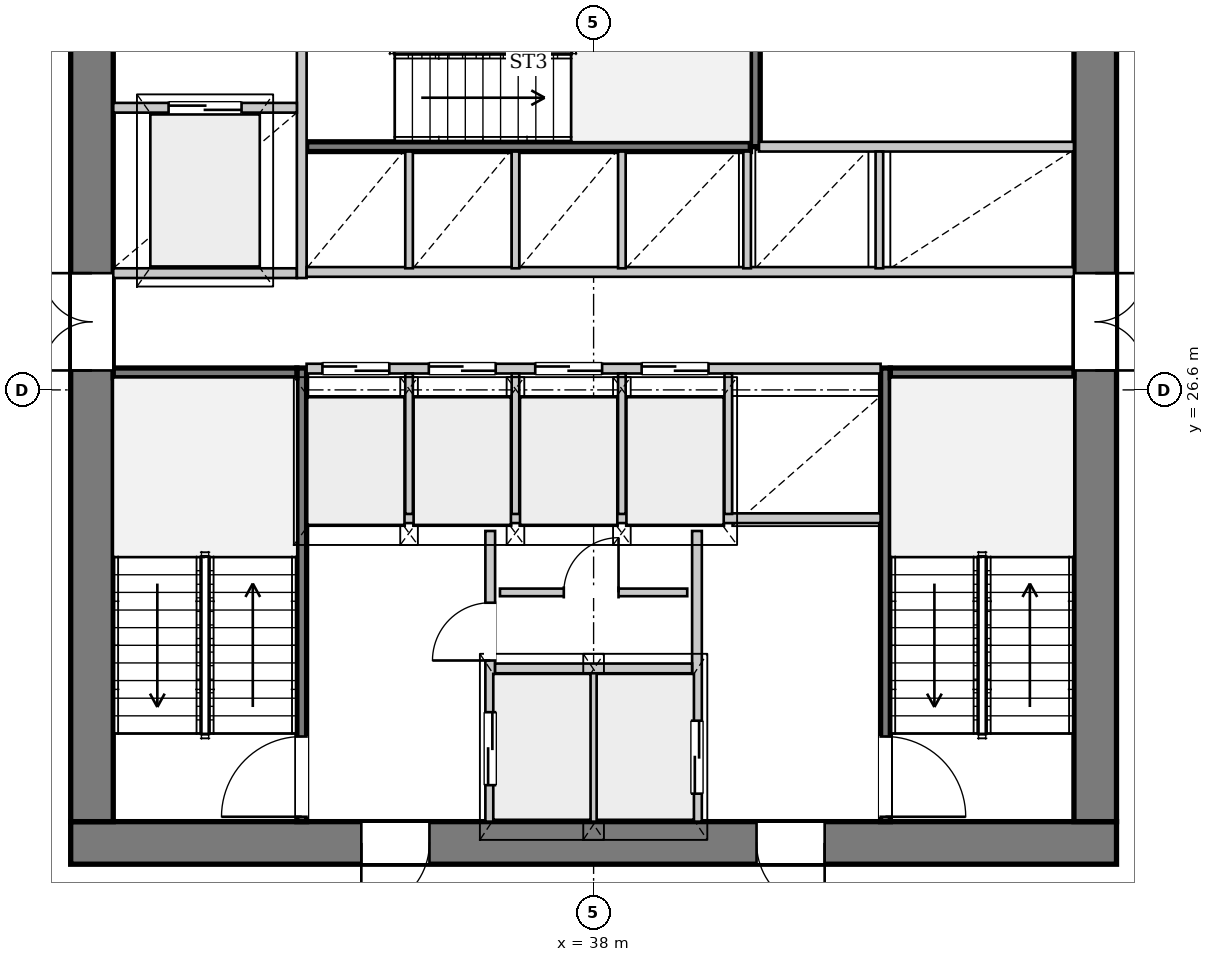
"""IFC4 building model, lengths in metres.
Left out: names, types, materials, properties, quantities, classifications, styles, units other than length and angle.
Written with IfcOpenShell. Run it as: python <this file> out.ifc"""

import sys

from ifc_helpers import new_model, si_unit, direction, frame, frame_2d, origin, place, context, subcontext, project, spatial, rectangle, extrude, source, transform, mapped, element, fill, save


model = new_model("IFC4")
c1 = context("Model", 3, precision=1e-05, world=origin(), true_north=direction((0.0, 1.0)))
c2 = subcontext(c1, "Body", "Model", "MODEL_VIEW")
j1 = project(units=[si_unit("LENGTHUNIT", "METRE"), si_unit("PLANEANGLEUNIT", "RADIAN")], contexts=[c1])
p1 = place(None, origin())
s1 = spatial("IfcSite", under=j1, at=p1, CompositionType="ELEMENT")
p2 = place(p1, origin())
s2 = spatial("IfcBuilding", under=s1, at=p2, CompositionType="ELEMENT")
p3 = place(p2, frame((0.0, 0.0, 87.95)))
s3 = spatial("IfcBuildingStorey", under=s2, at=p3, CompositionType="ELEMENT", Elevation=87.95)
p4 = place(p3, frame((46.6, 19.15, 0.0), z_axis=(0.0, 0.0, 1.0), x_axis=(-1.0, 0.0, 0.0)))
e1 = element("IfcWall", 1, at=p4, inside=s3, PredefinedType="SHEAR", context=c2, shape_type="SweptSolid", body=[
    extrude(rectangle(XDim=17.2, YDim=0.7, at=frame_2d((8.6, 0.0))), origin(), (0.0, 0.0, 1.0), 3.3),
])
p5 = place(p4, frame((4.8, 0.0, 0.0)))
e2 = element("IfcOpeningElement", 2, at=p5, cuts=e1, PredefinedType="OPENING", context=c2, shape_type="SweptSolid", body=[
    extrude(rectangle(XDim=1.12, YDim=2.25, at=frame_2d((0.56, 1.125))), frame((0.0, 0.36, 0.0), z_axis=(0.0, -1.0, 0.0), x_axis=(1.0, 0.0, 0.0)), (0.0, 0.0, 1.0), 0.72),
])
p6 = place(p4, frame((11.3, 0.0, 0.0)))
e3 = element("IfcOpeningElement", 3, at=p6, cuts=e1, PredefinedType="OPENING", context=c2, shape_type="SweptSolid", body=[
    extrude(rectangle(XDim=1.12, YDim=2.25, at=frame_2d((0.56, 1.125))), frame((0.0, 0.36, 0.0), z_axis=(0.0, -1.0, 0.0), x_axis=(1.0, 0.0, 0.0)), (0.0, 0.0, 1.0), 0.72),
])
p7 = place(p3, frame((29.75, 19.5, 0.0), z_axis=(0.0, 0.0, 1.0), x_axis=(0.0, 1.0, 0.0)))
e4 = element("IfcWall", 4, at=p7, inside=s3, PredefinedType="SHEAR", context=c2, shape_type="SweptSolid", body=[
    extrude(rectangle(XDim=14.2, YDim=0.7, at=frame_2d((7.1, 0.0))), origin(), (0.0, 0.0, 1.0), 3.3),
])
p8 = place(p7, frame((7.42, 0.0, 0.0)))
e5 = element("IfcOpeningElement", 5, at=p8, cuts=e4, PredefinedType="OPENING", context=c2, shape_type="SweptSolid", body=[
    extrude(rectangle(XDim=1.6, YDim=2.2, at=frame_2d((0.8, 1.1))), frame((0.0, 0.36, 0.0), z_axis=(0.0, -1.0, 0.0), x_axis=(1.0, 0.0, 0.0)), (0.0, 0.0, 1.0), 0.72),
])
p9 = place(p3, frame((46.25, 33.7, 0.0), z_axis=(0.0, 0.0, 1.0), x_axis=(0.0, -1.0, 0.0)))
e6 = element("IfcWall", 6, at=p9, inside=s3, PredefinedType="SHEAR", context=c2, shape_type="SweptSolid", body=[
    extrude(rectangle(XDim=14.2, YDim=0.7, at=frame_2d((7.1, 0.0))), origin(), (0.0, 0.0, 1.0), 3.3),
])
p10 = place(p9, frame((5.18, 0.0, 0.0)))
e7 = element("IfcOpeningElement", 7, at=p10, cuts=e6, PredefinedType="OPENING", context=c2, shape_type="SweptSolid", body=[
    extrude(rectangle(XDim=1.6, YDim=2.2, at=frame_2d((0.8, 1.1))), frame((0.0, 0.36, 0.0), z_axis=(0.0, -1.0, 0.0), x_axis=(1.0, 0.0, 0.0)), (0.0, 0.0, 1.0), 0.72),
])
p11 = place(p3, frame((33.2, 19.5, 0.0), z_axis=(0.0, 0.0, 1.0), x_axis=(0.0, 1.0, 0.0)))
e8 = element("IfcWall", 8, at=p11, inside=s3, PredefinedType="PARTITIONING", context=c2, shape_type="SweptSolid", body=[
    extrude(rectangle(XDim=7.46, YDim=0.16, at=frame_2d((3.73, 0.0))), origin(), (0.0, 0.0, 1.0), 3.3),
])
p12 = place(p11, frame((0.08, 0.0, 0.0)))
e9 = element("IfcOpeningElement", 9, at=p12, cuts=e8, PredefinedType="OPENING", context=c2, shape_type="SweptSolid", body=[
    extrude(rectangle(XDim=1.32, YDim=2.2, at=frame_2d((0.66, 1.1))), frame((0.0, 0.09, 0.0), z_axis=(0.0, -1.0, 0.0), x_axis=(1.0, 0.0, 0.0)), (0.0, 0.0, 1.0), 0.18),
])
p13 = place(p3, frame((30.1, 26.88, 0.0), z_axis=(0.0, 0.0, 1.0), x_axis=(1.0, 0.0, 0.0)))
e10 = element("IfcWall", 10, at=p13, inside=s3, PredefinedType="PARTITIONING", context=c2, shape_type="SweptSolid", body=[
    extrude(rectangle(XDim=3.02, YDim=0.16, at=frame_2d((1.51, 0.0))), origin(), (0.0, 0.0, 1.0), 3.3),
])
p14 = place(p3, frame((42.8, 26.96, 0.0), z_axis=(0.0, 0.0, 1.0), x_axis=(0.0, -1.0, 0.0)))
e11 = element("IfcWall", 11, at=p14, inside=s3, PredefinedType="PARTITIONING", context=c2, shape_type="SweptSolid", body=[
    extrude(rectangle(XDim=7.46, YDim=0.16, at=frame_2d((3.73, 0.0))), origin(), (0.0, 0.0, 1.0), 3.3),
])
p15 = place(p14, frame((6.06, 0.0, 0.0)))
e12 = element("IfcOpeningElement", 12, at=p15, cuts=e11, PredefinedType="OPENING", context=c2, shape_type="SweptSolid", body=[
    extrude(rectangle(XDim=1.32, YDim=2.2, at=frame_2d((0.66, 1.1))), frame((0.0, 0.09, 0.0), z_axis=(0.0, -1.0, 0.0), x_axis=(1.0, 0.0, 0.0)), (0.0, 0.0, 1.0), 0.18),
])
p16 = place(p3, frame((42.88, 26.88, 0.0), z_axis=(0.0, 0.0, 1.0), x_axis=(1.0, 0.0, 0.0)))
e13 = element("IfcWall", 13, at=p16, inside=s3, PredefinedType="PARTITIONING", context=c2, shape_type="SweptSolid", body=[
    extrude(rectangle(XDim=3.02, YDim=0.16, at=frame_2d((1.51, 0.0))), origin(), (0.0, 0.0, 1.0), 3.3),
])
p17 = place(p3, frame((33.28, 30.6, 0.0), z_axis=(0.0, 0.0, 1.0), x_axis=(1.0, 0.0, 0.0)))
e14 = element("IfcWall", 14, at=p17, inside=s3, PredefinedType="PARTITIONING", context=c2, shape_type="SweptSolid", body=[
    extrude(rectangle(XDim=7.3, YDim=0.16, at=frame_2d((3.65, 0.0))), origin(), (0.0, 0.0, 1.0), 3.3),
])
p18 = place(p3, frame((40.66, 30.6, 0.0), z_axis=(0.0, 0.0, 1.0), x_axis=(0.0, 1.0, 0.0)))
e15 = element("IfcWall", 15, at=p18, inside=s3, PredefinedType="PARTITIONING", context=c2, shape_type="SweptSolid", body=[
    extrude(rectangle(XDim=3.1, YDim=0.16, at=frame_2d((1.55, 0.0))), origin(), (0.0, 0.0, 1.0), 3.3),
])
p19 = place(p3, frame((36.3, 19.5, 0.0), z_axis=(0.0, 0.0, 1.0), x_axis=(0.0, 1.0, 0.0)))
e16 = element("IfcWall", 16, at=p19, inside=s3, PredefinedType="PARTITIONING", context=c2, shape_type="SweptSolid", body=[
    extrude(rectangle(XDim=4.78, YDim=0.16, at=frame_2d((2.39, 0.0))), origin(), (0.0, 0.0, 1.0), 3.3),
])
p20 = place(p19, frame((0.6, 0.0, 0.0)))
e17 = element("IfcOpeningElement", 17, at=p20, cuts=e16, PredefinedType="OPENING", context=c2, shape_type="SweptSolid", body=[
    extrude(rectangle(XDim=1.2, YDim=2.2, at=frame_2d((0.6, 1.1))), frame((0.0, 0.09, 0.0), z_axis=(0.0, -1.0, 0.0), x_axis=(1.0, 0.0, 0.0)), (0.0, 0.0, 1.0), 0.18),
])
p21 = place(p19, frame((2.65, 0.0, 0.0)))
e18 = element("IfcOpeningElement", 18, at=p21, cuts=e16, PredefinedType="OPENING", context=c2, shape_type="SweptSolid", body=[
    extrude(rectangle(XDim=0.95, YDim=2.1, at=frame_2d((0.475, 1.05))), frame((0.0, 0.09, 0.0), z_axis=(0.0, -1.0, 0.0), x_axis=(1.0, 0.0, 0.0)), (0.0, 0.0, 1.0), 0.18),
])
p22 = place(p3, frame((39.7, 24.28, 0.0), z_axis=(0.0, 0.0, 1.0), x_axis=(0.0, -1.0, 0.0)))
e19 = element("IfcWall", 19, at=p22, inside=s3, PredefinedType="PARTITIONING", context=c2, shape_type="SweptSolid", body=[
    extrude(rectangle(XDim=4.78, YDim=0.16, at=frame_2d((2.39, 0.0))), origin(), (0.0, 0.0, 1.0), 3.3),
])
p23 = place(p22, frame((3.12, 0.0, 0.0)))
e20 = element("IfcOpeningElement", 20, at=p23, cuts=e19, PredefinedType="OPENING", context=c2, shape_type="SweptSolid", body=[
    extrude(rectangle(XDim=1.2, YDim=2.2, at=frame_2d((0.6, 1.1))), frame((0.0, 0.09, 0.0), z_axis=(0.0, -1.0, 0.0), x_axis=(1.0, 0.0, 0.0)), (0.0, 0.0, 1.0), 0.18),
])
p24 = place(p3, frame((38.0, 19.5, 0.0), z_axis=(0.0, 0.0, 1.0), x_axis=(0.0, 1.0, 0.0)))
e21 = element("IfcWall", 21, at=p24, inside=s3, PredefinedType="PARTITIONING", context=c2, shape_type="SweptSolid", body=[
    extrude(rectangle(XDim=2.46, YDim=0.125, at=frame_2d((1.23, 0.0))), origin(), (0.0, 0.0, 1.0), 3.3),
])
p25 = place(p3, frame((36.38, 22.02, 0.0), z_axis=(0.0, 0.0, 1.0), x_axis=(1.0, 0.0, 0.0)))
e22 = element("IfcWall", 22, at=p25, inside=s3, PredefinedType="PARTITIONING", context=c2, shape_type="SweptSolid", body=[
    extrude(rectangle(XDim=3.24, YDim=0.16, at=frame_2d((1.62, 0.0))), origin(), (0.0, 0.0, 1.0), 3.3),
])
p26 = place(p3, frame((33.28, 24.49, 0.0), z_axis=(0.0, 0.0, 1.0), x_axis=(1.0, 0.0, 0.0)))
e23 = element("IfcWall", 23, at=p26, inside=s3, PredefinedType="PARTITIONING", context=c2, shape_type="SweptSolid", body=[
    extrude(rectangle(XDim=9.44, YDim=0.16, at=frame_2d((4.72, 0.0))), origin(), (0.0, 0.0, 1.0), 3.3),
])
p27 = place(p3, frame((36.46, 23.27, 0.0), z_axis=(0.0, 0.0, 1.0), x_axis=(1.0, 0.0, 0.0)))
e24 = element("IfcWall", 24, at=p27, inside=s3, PredefinedType="PARTITIONING", context=c2, shape_type="SweptSolid", body=[
    extrude(rectangle(XDim=3.08, YDim=0.125, at=frame_2d((1.54, 0.0))), origin(), (0.0, 0.0, 1.0), 3.3),
])
p28 = place(p27, frame((1.05, 0.0, 0.0)))
e25 = element("IfcOpeningElement", 25, at=p28, cuts=e24, PredefinedType="OPENING", context=c2, shape_type="SweptSolid", body=[
    extrude(rectangle(XDim=0.9, YDim=2.1, at=frame_2d((0.45, 1.05))), frame((0.0, 0.073, 0.0), z_axis=(0.0, -1.0, 0.0), x_axis=(1.0, 0.0, 0.0)), (0.0, 0.0, 1.0), 0.145),
])
p29 = place(p3, frame((30.1, 28.52, 0.0), z_axis=(0.0, 0.0, 1.0), x_axis=(1.0, 0.0, 0.0)))
e26 = element("IfcWall", 26, at=p29, inside=s3, PredefinedType="PARTITIONING", context=c2, shape_type="SweptSolid", body=[
    extrude(rectangle(XDim=3.02, YDim=0.16, at=frame_2d((1.51, 0.0))), origin(), (0.0, 0.0, 1.0), 3.3),
])
p30 = place(p3, frame((33.2, 28.44, 0.0), z_axis=(0.0, 0.0, 1.0), x_axis=(0.0, 1.0, 0.0)))
e27 = element("IfcWall", 27, at=p30, inside=s3, PredefinedType="PARTITIONING", context=c2, shape_type="SweptSolid", body=[
    extrude(rectangle(XDim=5.26, YDim=0.16, at=frame_2d((2.63, 0.0))), origin(), (0.0, 0.0, 1.0), 3.3),
])
p31 = place(p3, frame((30.1, 31.24, 0.0), z_axis=(0.0, 0.0, 1.0), x_axis=(1.0, 0.0, 0.0)))
e28 = element("IfcWall", 28, at=p31, inside=s3, PredefinedType="PARTITIONING", context=c2, shape_type="SweptSolid", body=[
    extrude(rectangle(XDim=3.02, YDim=0.16, at=frame_2d((1.51, 0.0))), origin(), (0.0, 0.0, 1.0), 3.3),
])
p32 = place(p31, frame((0.91, 0.0, 0.0)))
e29 = element("IfcOpeningElement", 29, at=p32, cuts=e28, PredefinedType="OPENING", context=c2, shape_type="SweptSolid", body=[
    extrude(rectangle(XDim=1.2, YDim=2.2, at=frame_2d((0.6, 1.1))), frame((0.0, 0.09, 0.0), z_axis=(0.0, -1.0, 0.0), x_axis=(1.0, 0.0, 0.0)), (0.0, 0.0, 1.0), 0.18),
])
p33 = place(p3, frame((33.28, 26.95, 0.0), z_axis=(0.0, 0.0, 1.0), x_axis=(1.0, 0.0, 0.0)))
e30 = element("IfcWall", 30, at=p33, inside=s3, PredefinedType="PARTITIONING", context=c2, shape_type="SweptSolid", body=[
    extrude(rectangle(XDim=9.44, YDim=0.16, at=frame_2d((4.72, 0.0))), origin(), (0.0, 0.0, 1.0), 3.3),
])
p34 = place(p33, frame((0.26, 0.0, 0.0)))
e31 = element("IfcOpeningElement", 31, at=p34, cuts=e30, PredefinedType="OPENING", context=c2, shape_type="SweptSolid", body=[
    extrude(rectangle(XDim=1.1, YDim=2.2, at=frame_2d((0.55, 1.1))), frame((0.0, 0.09, 0.0), z_axis=(0.0, -1.0, 0.0), x_axis=(1.0, 0.0, 0.0)), (0.0, 0.0, 1.0), 0.18),
])
p35 = place(p33, frame((2.01, 0.0, 0.0)))
e32 = element("IfcOpeningElement", 32, at=p35, cuts=e30, PredefinedType="OPENING", context=c2, shape_type="SweptSolid", body=[
    extrude(rectangle(XDim=1.1, YDim=2.2, at=frame_2d((0.55, 1.1))), frame((0.0, 0.09, 0.0), z_axis=(0.0, -1.0, 0.0), x_axis=(1.0, 0.0, 0.0)), (0.0, 0.0, 1.0), 0.18),
])
p36 = place(p33, frame((3.76, 0.0, 0.0)))
e33 = element("IfcOpeningElement", 33, at=p36, cuts=e30, PredefinedType="OPENING", context=c2, shape_type="SweptSolid", body=[
    extrude(rectangle(XDim=1.1, YDim=2.2, at=frame_2d((0.55, 1.1))), frame((0.0, 0.09, 0.0), z_axis=(0.0, -1.0, 0.0), x_axis=(1.0, 0.0, 0.0)), (0.0, 0.0, 1.0), 0.18),
])
p37 = place(p33, frame((5.51, 0.0, 0.0)))
e34 = element("IfcOpeningElement", 34, at=p37, cuts=e30, PredefinedType="OPENING", context=c2, shape_type="SweptSolid", body=[
    extrude(rectangle(XDim=1.1, YDim=2.2, at=frame_2d((0.55, 1.1))), frame((0.0, 0.09, 0.0), z_axis=(0.0, -1.0, 0.0), x_axis=(1.0, 0.0, 0.0)), (0.0, 0.0, 1.0), 0.18),
])
for number, where, z_axis, x_axis in (
    (35, (34.965, 24.56, 0.0), (0.0, 0.0, 1.0), (0.0, 1.0, 0.0)),
    (36, (36.715, 24.56, 0.0), (0.0, 0.0, 1.0), (0.0, 1.0, 0.0)),
    (37, (38.465, 24.56, 0.0), (0.0, 0.0, 1.0), (0.0, 1.0, 0.0)),
    (38, (40.215, 24.56, 0.0), (0.0, 0.0, 1.0), (0.0, 1.0, 0.0)),
):
    element("IfcWall", number, at=place(p3, frame(where, z_axis=z_axis, x_axis=x_axis)), inside=s3, PredefinedType="PARTITIONING", context=c2, shape_type="SweptSolid", body=[
        extrude(rectangle(XDim=2.31, YDim=0.125, at=frame_2d((1.155, 0.0))), origin(), (0.0, 0.0, 1.0), 3.3),
    ])
p38 = place(p3, frame((33.28, 28.54, 0.0), z_axis=(0.0, 0.0, 1.0), x_axis=(1.0, 0.0, 0.0)))
e39 = element("IfcWall", 39, at=p38, inside=s3, PredefinedType="PARTITIONING", context=c2, shape_type="SweptSolid", body=[
    extrude(rectangle(XDim=12.62, YDim=0.16, at=frame_2d((6.31, 0.0))), origin(), (0.0, 0.0, 1.0), 3.3),
])
p39 = place(p3, frame((40.72, 30.6, 0.0), z_axis=(0.0, 0.0, 1.0), x_axis=(1.0, 0.0, 0.0)))
e40 = element("IfcWall", 40, at=p39, inside=s3, PredefinedType="PARTITIONING", context=c2, shape_type="SweptSolid", body=[
    extrude(rectangle(XDim=5.18, YDim=0.16, at=frame_2d((2.59, 0.0))), origin(), (0.0, 0.0, 1.0), 3.3),
])
for number, where, z_axis, x_axis in (
    (41, (34.965, 28.6, 0.0), (0.0, 0.0, 1.0), (0.0, 1.0, 0.0)),
    (42, (36.715, 28.6, 0.0), (0.0, 0.0, 1.0), (0.0, 1.0, 0.0)),
    (43, (38.465, 28.6, 0.0), (0.0, 0.0, 1.0), (0.0, 1.0, 0.0)),
    (44, (40.525, 28.6, 0.0), (0.0, 0.0, 1.0), (0.0, 1.0, 0.0)),
    (45, (42.7, 28.6, 0.0), (0.0, 0.0, 1.0), (0.0, 1.0, 0.0)),
):
    element("IfcWall", number, at=place(p3, frame(where, z_axis=z_axis, x_axis=x_axis)), inside=s3, PredefinedType="PARTITIONING", context=c2, shape_type="SweptSolid", body=[
        extrude(rectangle(XDim=1.92, YDim=0.125, at=frame_2d((0.96, 0.0))), origin(), (0.0, 0.0, 1.0), 3.3),
    ])
m1 = source(origin(), c2, "Body", "SweptSolid", [
    extrude(rectangle(XDim=1.12, YDim=2.25, at=frame_2d((0.56, 1.125))), frame((0.0, 0.025, 0.0), z_axis=(0.0, -1.0, 0.0), x_axis=(1.0, 0.0, 0.0)), (0.0, 0.0, 1.0), 0.05),
])
p40 = place(p5, origin())
e46 = element("IfcDoor", 46, at=p40, inside=s3, OperationType="SINGLE_SWING_LEFT", PredefinedType="DOOR", context=c2, shape_type="MappedRepresentation", body=[
    mapped(m1, transform((0.0, 0.0, 0.0), x_axis=(1.0, 0.0, 0.0), y_axis=(0.0, 1.0, 0.0), z_axis=(0.0, 0.0, 1.0), scale=1.0)),
])
fill(e2, e46)
p41 = place(p6, origin())
e47 = element("IfcDoor", 47, at=p41, inside=s3, OperationType="SINGLE_SWING_RIGHT", PredefinedType="DOOR", context=c2, shape_type="MappedRepresentation", body=[
    mapped(m1, transform((0.0, 0.0, 0.0), x_axis=(1.0, 0.0, 0.0), y_axis=(0.0, 1.0, 0.0), z_axis=(0.0, 0.0, 1.0), scale=1.0)),
])
fill(e3, e47)
m2 = source(origin(), c2, "Body", "SweptSolid", [
    extrude(rectangle(XDim=1.6, YDim=2.2, at=frame_2d((0.8, 1.1))), frame((0.0, 0.025, 0.0), z_axis=(0.0, -1.0, 0.0), x_axis=(1.0, 0.0, 0.0)), (0.0, 0.0, 1.0), 0.05),
])
p42 = place(p8, origin())
e48 = element("IfcDoor", 48, at=p42, inside=s3, OperationType="DOUBLE_DOOR_SINGLE_SWING", PredefinedType="DOOR", context=c2, shape_type="MappedRepresentation", body=[
    mapped(m2, transform((0.0, 0.0, 0.0), x_axis=(1.0, 0.0, 0.0), y_axis=(0.0, 1.0, 0.0), z_axis=(0.0, 0.0, 1.0), scale=1.0)),
])
fill(e5, e48)
p43 = place(p10, origin())
e49 = element("IfcDoor", 49, at=p43, inside=s3, OperationType="DOUBLE_DOOR_SINGLE_SWING", PredefinedType="DOOR", context=c2, shape_type="MappedRepresentation", body=[
    mapped(m2, transform((0.0, 0.0, 0.0), x_axis=(1.0, 0.0, 0.0), y_axis=(0.0, 1.0, 0.0), z_axis=(0.0, 0.0, 1.0), scale=1.0)),
])
fill(e7, e49)
m3 = source(origin(), c2, "Body", "SweptSolid", [
    extrude(rectangle(XDim=1.32, YDim=2.2, at=frame_2d((0.66, 1.1))), frame((0.0, 0.025, 0.0), z_axis=(0.0, -1.0, 0.0), x_axis=(1.0, 0.0, 0.0)), (0.0, 0.0, 1.0), 0.05),
])
p44 = place(p12, origin())
e50 = element("IfcDoor", 50, at=p44, inside=s3, OperationType="SINGLE_SWING_LEFT", PredefinedType="DOOR", context=c2, shape_type="MappedRepresentation", body=[
    mapped(m3, transform((0.0, 0.0, 0.0), x_axis=(1.0, 0.0, 0.0), y_axis=(0.0, 1.0, 0.0), z_axis=(0.0, 0.0, 1.0), scale=1.0)),
])
fill(e9, e50)
p45 = place(p15, origin())
e51 = element("IfcDoor", 51, at=p45, inside=s3, OperationType="SINGLE_SWING_RIGHT", PredefinedType="DOOR", context=c2, shape_type="MappedRepresentation", body=[
    mapped(m3, transform((0.0, 0.0, 0.0), x_axis=(1.0, 0.0, 0.0), y_axis=(0.0, 1.0, 0.0), z_axis=(0.0, 0.0, 1.0), scale=1.0)),
])
fill(e12, e51)
m4 = source(origin(), c2, "Body", "SweptSolid", [
    extrude(rectangle(XDim=1.2, YDim=2.2, at=frame_2d((0.6, 1.1))), frame((0.0, 0.025, 0.0), z_axis=(0.0, -1.0, 0.0), x_axis=(1.0, 0.0, 0.0)), (0.0, 0.0, 1.0), 0.05),
])
p46 = place(p20, origin())
e52 = element("IfcDoor", 52, at=p46, inside=s3, OperationType="DOUBLE_DOOR_SLIDING", PredefinedType="DOOR", context=c2, shape_type="MappedRepresentation", body=[
    mapped(m4, transform((0.0, 0.0, 0.0), x_axis=(1.0, 0.0, 0.0), y_axis=(0.0, 1.0, 0.0), z_axis=(0.0, 0.0, 1.0), scale=1.0)),
])
fill(e17, e52)
m5 = source(origin(), c2, "Body", "SweptSolid", [
    extrude(rectangle(XDim=0.95, YDim=2.1, at=frame_2d((0.475, 1.05))), frame((0.0, 0.025, 0.0), z_axis=(0.0, -1.0, 0.0), x_axis=(1.0, 0.0, 0.0)), (0.0, 0.0, 1.0), 0.05),
])
p47 = place(p21, origin())
e53 = element("IfcDoor", 53, at=p47, inside=s3, OperationType="SINGLE_SWING_LEFT", PredefinedType="DOOR", context=c2, shape_type="MappedRepresentation", body=[
    mapped(m5, transform((0.0, 0.0, 0.0), x_axis=(1.0, 0.0, 0.0), y_axis=(0.0, 1.0, 0.0), z_axis=(0.0, 0.0, 1.0), scale=1.0)),
])
fill(e18, e53)
m6 = source(origin(), c2, "Body", "SweptSolid", [
    extrude(rectangle(XDim=0.9, YDim=2.1, at=frame_2d((0.45, 1.05))), frame((0.0, 0.025, 0.0), z_axis=(0.0, -1.0, 0.0), x_axis=(1.0, 0.0, 0.0)), (0.0, 0.0, 1.0), 0.05),
])
p48 = place(p28, origin())
e54 = element("IfcDoor", 54, at=p48, inside=s3, OperationType="SINGLE_SWING_RIGHT", PredefinedType="DOOR", context=c2, shape_type="MappedRepresentation", body=[
    mapped(m6, transform((0.0, 0.0, 0.0), x_axis=(1.0, 0.0, 0.0), y_axis=(0.0, 1.0, 0.0), z_axis=(0.0, 0.0, 1.0), scale=1.0)),
])
fill(e25, e54)
p49 = place(p23, origin())
e55 = element("IfcDoor", 55, at=p49, inside=s3, OperationType="DOUBLE_DOOR_SLIDING", PredefinedType="DOOR", context=c2, shape_type="MappedRepresentation", body=[
    mapped(m4, transform((0.0, 0.0, 0.0), x_axis=(1.0, 0.0, 0.0), y_axis=(0.0, 1.0, 0.0), z_axis=(0.0, 0.0, 1.0), scale=1.0)),
])
fill(e20, e55)
p50 = place(p32, origin())
e56 = element("IfcDoor", 56, at=p50, inside=s3, OperationType="DOUBLE_DOOR_SLIDING", PredefinedType="DOOR", context=c2, shape_type="MappedRepresentation", body=[
    mapped(m4, transform((0.0, 0.0, 0.0), x_axis=(1.0, 0.0, 0.0), y_axis=(0.0, 1.0, 0.0), z_axis=(0.0, 0.0, 1.0), scale=1.0)),
])
fill(e29, e56)
m7 = source(origin(), c2, "Body", "SweptSolid", [
    extrude(rectangle(XDim=1.1, YDim=2.2, at=frame_2d((0.55, 1.1))), frame((0.0, 0.025, 0.0), z_axis=(0.0, -1.0, 0.0), x_axis=(1.0, 0.0, 0.0)), (0.0, 0.0, 1.0), 0.05),
])
p51 = place(p34, origin())
e57 = element("IfcDoor", 57, at=p51, inside=s3, OperationType="DOUBLE_DOOR_SLIDING", PredefinedType="DOOR", context=c2, shape_type="MappedRepresentation", body=[
    mapped(m7, transform((0.0, 0.0, 0.0), x_axis=(1.0, 0.0, 0.0), y_axis=(0.0, 1.0, 0.0), z_axis=(0.0, 0.0, 1.0), scale=1.0)),
])
fill(e31, e57)
p52 = place(p35, origin())
e58 = element("IfcDoor", 58, at=p52, inside=s3, OperationType="DOUBLE_DOOR_SLIDING", PredefinedType="DOOR", context=c2, shape_type="MappedRepresentation", body=[
    mapped(m7, transform((0.0, 0.0, 0.0), x_axis=(1.0, 0.0, 0.0), y_axis=(0.0, 1.0, 0.0), z_axis=(0.0, 0.0, 1.0), scale=1.0)),
])
fill(e32, e58)
p53 = place(p36, origin())
e59 = element("IfcDoor", 59, at=p53, inside=s3, OperationType="DOUBLE_DOOR_SLIDING", PredefinedType="DOOR", context=c2, shape_type="MappedRepresentation", body=[
    mapped(m7, transform((0.0, 0.0, 0.0), x_axis=(1.0, 0.0, 0.0), y_axis=(0.0, 1.0, 0.0), z_axis=(0.0, 0.0, 1.0), scale=1.0)),
])
fill(e33, e59)
p54 = place(p37, origin())
e60 = element("IfcDoor", 60, at=p54, inside=s3, OperationType="DOUBLE_DOOR_SLIDING", PredefinedType="DOOR", context=c2, shape_type="MappedRepresentation", body=[
    mapped(m7, transform((0.0, 0.0, 0.0), x_axis=(1.0, 0.0, 0.0), y_axis=(0.0, 1.0, 0.0), z_axis=(0.0, 0.0, 1.0), scale=1.0)),
])
fill(e34, e60)
save(model, sys.argv[1])
